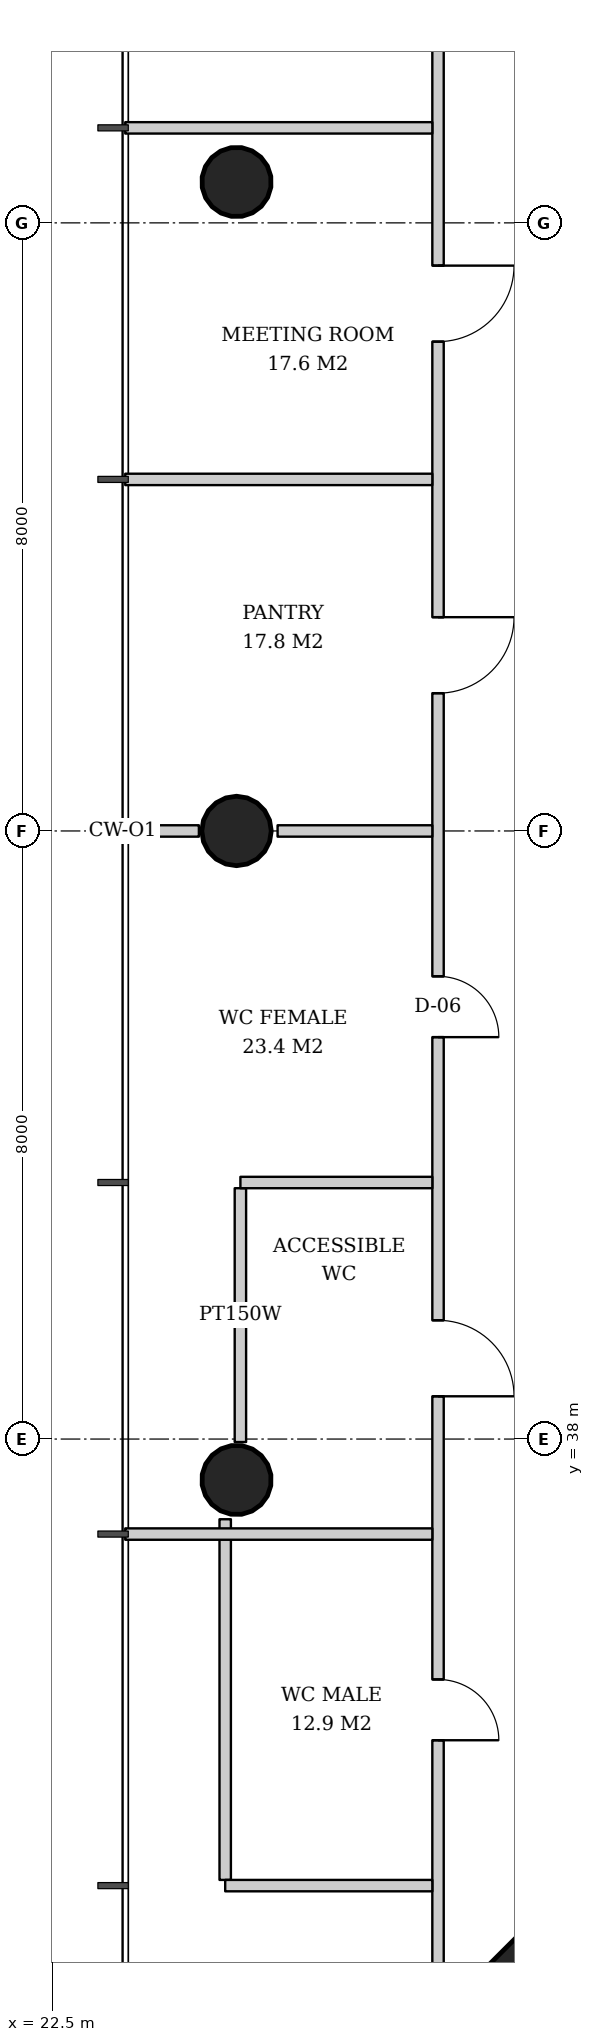
"""IFC4 building model, lengths in metres.
Left out: names, types, materials, properties, quantities, classifications, styles, units other than length and angle.
Written with IfcOpenShell. Run it as: python <this file> out.ifc"""

import sys

from ifc_helpers import new_model, si_unit, direction, frame, frame_2d, origin, origin_2d, place, context, subcontext, project, spatial, rectangle, hollow_circle, extrude, element, fill, save


model = new_model("IFC4")
c1 = context("Model", 3, precision=1e-05, world=origin(), true_north=direction((0.0, 1.0)))
c2 = subcontext(c1, "Body", "Model", "MODEL_VIEW")
j1 = project(units=[si_unit("LENGTHUNIT", "METRE"), si_unit("PLANEANGLEUNIT", "RADIAN")], contexts=[c1])
p1 = place(None, origin())
s1 = spatial("IfcSite", under=j1, at=p1, CompositionType="ELEMENT")
p2 = place(p1, origin())
s2 = spatial("IfcBuilding", under=s1, at=p2, CompositionType="ELEMENT")
p3 = place(p2, frame((0.0, 0.0, 142.6)))
s3 = spatial("IfcBuildingStorey", under=s2, at=p3, CompositionType="ELEMENT", Elevation=142.6)
p4 = place(p3, frame((28.986, 29.986, 0.0), z_axis=(0.031964207655, 0.031964207655, 0.998977766949), x_axis=(-0.707106781187, 0.707106781187, 0.0)))
e1 = element("IfcColumn", 1, at=p4, inside=s3, PredefinedType="COLUMN", context=c2, shape_type="SweptSolid", body=[
    extrude(rectangle(XDim=2.6, YDim=2.6, at=origin_2d()), origin(), (0.0, 0.0, 1.0), 3.804),
])
p5 = place(p3, frame((24.886, 54.557, 0.0), z_axis=(0.031912317206, -0.01598826355, 0.999362786699), x_axis=(0.447933021895, 0.894067115991, 0.0)))
e2 = element("IfcColumn", 2, at=p5, inside=s3, PredefinedType="COLUMN", context=c2, shape_type="SweptSolid", body=[
    extrude(hollow_circle(Radius=0.457, WallThickness=0.03, at=origin_2d()), origin(), (0.0, 0.0, 1.0), 3.802),
])
p6 = place(p3, frame((24.886, 46.0, 0.0), z_axis=(0.031916396774, 0.0, 0.999490542035), x_axis=(0.0, 1.0, 0.0)))
e3 = element("IfcColumn", 3, at=p6, inside=s3, PredefinedType="COLUMN", context=c2, shape_type="SweptSolid", body=[
    extrude(hollow_circle(Radius=0.457, WallThickness=0.03, at=origin_2d()), origin(), (0.0, 0.0, 1.0), 3.802),
])
p7 = place(p3, frame((24.886, 37.443, 0.0), z_axis=(0.031912317206, 0.01598826355, 0.999362786699), x_axis=(-0.447933021895, 0.894067115991, 0.0)))
e4 = element("IfcColumn", 4, at=p7, inside=s3, PredefinedType="COLUMN", context=c2, shape_type="SweptSolid", body=[
    extrude(hollow_circle(Radius=0.457, WallThickness=0.03, at=origin_2d()), origin(), (0.0, 0.0, 1.0), 3.802),
])
p8 = place(p3, frame((24.975, 41.3, 0.0), z_axis=(0.0, 0.0, 1.0), x_axis=(0.0, -1.0, 0.0)))
e5 = element("IfcWall", 5, at=p8, inside=s3, PredefinedType="PARTITIONING", context=c2, shape_type="SweptSolid", body=[
    extrude(rectangle(XDim=3.34, YDim=0.15, at=frame_2d((1.67, 0.0))), origin(), (0.0, 0.0, 1.0), 2.806),
])
p9 = place(p3, frame((24.775, 36.945, 0.0), z_axis=(0.0, 0.0, 1.0), x_axis=(0.0, -1.0, 0.0)))
e6 = element("IfcWall", 6, at=p9, inside=s3, PredefinedType="PARTITIONING", context=c2, shape_type="SweptSolid", body=[
    extrude(rectangle(XDim=4.745, YDim=0.15, at=frame_2d((2.373, 0.0))), origin(), (0.0, 0.0, 1.0), 3.62),
])
p10 = place(p3, frame((27.575, 61.511, 0.0), z_axis=(0.0, 0.0, 1.0), x_axis=(0.0, -1.0, 0.0)))
e7 = element("IfcWall", 7, at=p10, inside=s3, PredefinedType="PARTITIONING", context=c2, shape_type="SweptSolid", body=[
    extrude(rectangle(XDim=31.023, YDim=0.15, at=frame_2d((15.511, 0.0))), origin(), (0.0, 0.0, 1.0), 2.72),
])
p11 = place(p10, frame((3.449, 0.0, 0.0)))
e8 = element("IfcOpeningElement", 8, at=p11, cuts=e7, PredefinedType="OPENING", context=c2, shape_type="SweptSolid", body=[
    extrude(rectangle(XDim=1.0, YDim=2.1, at=frame_2d((0.5, 1.05))), frame((0.0, 0.085, 0.0), z_axis=(0.0, -1.0, 0.0), x_axis=(1.0, 0.0, 0.0)), (0.0, 0.0, 1.0), 0.17),
])
p12 = place(p10, frame((8.074, 0.0, 0.0)))
e9 = element("IfcOpeningElement", 9, at=p12, cuts=e7, PredefinedType="OPENING", context=c2, shape_type="SweptSolid", body=[
    extrude(rectangle(XDim=1.0, YDim=2.1, at=frame_2d((0.5, 1.05))), frame((0.0, 0.085, 0.0), z_axis=(0.0, -1.0, 0.0), x_axis=(1.0, 0.0, 0.0)), (0.0, 0.0, 1.0), 0.17),
])
p13 = place(p10, frame((12.699, 0.0, 0.0)))
e10 = element("IfcOpeningElement", 10, at=p13, cuts=e7, PredefinedType="OPENING", context=c2, shape_type="SweptSolid", body=[
    extrude(rectangle(XDim=1.0, YDim=2.1, at=frame_2d((0.5, 1.05))), frame((0.0, 0.085, 0.0), z_axis=(0.0, -1.0, 0.0), x_axis=(1.0, 0.0, 0.0)), (0.0, 0.0, 1.0), 0.17),
])
p14 = place(p10, frame((17.424, 0.0, 0.0)))
e11 = element("IfcOpeningElement", 11, at=p14, cuts=e7, PredefinedType="OPENING", context=c2, shape_type="SweptSolid", body=[
    extrude(rectangle(XDim=0.8, YDim=2.1, at=frame_2d((0.4, 1.05))), frame((0.0, 0.085, 0.0), z_axis=(0.0, -1.0, 0.0), x_axis=(1.0, 0.0, 0.0)), (0.0, 0.0, 1.0), 0.17),
])
p15 = place(p10, frame((21.949, 0.0, 0.0)))
e12 = element("IfcOpeningElement", 12, at=p15, cuts=e7, PredefinedType="OPENING", context=c2, shape_type="SweptSolid", body=[
    extrude(rectangle(XDim=1.0, YDim=2.1, at=frame_2d((0.5, 1.05))), frame((0.0, 0.085, 0.0), z_axis=(0.0, -1.0, 0.0), x_axis=(1.0, 0.0, 0.0)), (0.0, 0.0, 1.0), 0.17),
])
p16 = place(p10, frame((26.674, 0.0, 0.0)))
e13 = element("IfcOpeningElement", 13, at=p16, cuts=e7, PredefinedType="OPENING", context=c2, shape_type="SweptSolid", body=[
    extrude(rectangle(XDim=0.8, YDim=2.1, at=frame_2d((0.4, 1.05))), frame((0.0, 0.085, 0.0), z_axis=(0.0, -1.0, 0.0), x_axis=(1.0, 0.0, 0.0)), (0.0, 0.0, 1.0), 0.17),
])
for number, where, z_axis, x_axis in (
    (14, (27.5, 55.25, 0.0), (0.0, 0.0, 1.0), (-1.0, 0.0, 0.0)),
    (15, (27.5, 50.625, 0.0), (0.0, 0.0, 1.0), (-1.0, 0.0, 0.0)),
):
    element("IfcWall", number, at=place(p3, frame(where, z_axis=z_axis, x_axis=x_axis)), inside=s3, PredefinedType="PARTITIONING", context=c2, shape_type="SweptSolid", body=[
        extrude(rectangle(XDim=4.04, YDim=0.15, at=frame_2d((2.02, 0.0))), origin(), (0.0, 0.0, 1.0), 2.82),
    ])
p17 = place(p3, frame((27.5, 46.0, 0.0), z_axis=(0.0, 0.0, 1.0), x_axis=(-1.0, 0.0, 0.0)))
e16 = element("IfcWall", 16, at=p17, inside=s3, PredefinedType="PARTITIONING", context=c2, shape_type="SweptSolid", body=[
    extrude(rectangle(XDim=2.036, YDim=0.15, at=frame_2d((1.018, 0.0))), origin(), (0.0, 0.0, 1.0), 3.62),
])
p18 = place(p3, frame((24.429, 46.0, 0.0), z_axis=(0.0, 0.0, 1.0), x_axis=(-1.0, 0.0, 0.0)))
e17 = element("IfcWall", 17, at=p18, inside=s3, PredefinedType="PARTITIONING", context=c2, shape_type="SweptSolid", body=[
    extrude(rectangle(XDim=0.969, YDim=0.15, at=frame_2d((0.484, 0.0))), origin(), (0.0, 0.0, 1.0), 3.62),
])
p19 = place(p3, frame((27.5, 41.375, 0.0), z_axis=(0.0, 0.0, 1.0), x_axis=(-1.0, 0.0, 0.0)))
e18 = element("IfcWall", 18, at=p19, inside=s3, PredefinedType="PARTITIONING", context=c2, shape_type="SweptSolid", body=[
    extrude(rectangle(XDim=2.525, YDim=0.15, at=frame_2d((1.262, 0.0))), origin(), (0.0, 0.0, 1.0), 2.82),
])
p20 = place(p3, frame((27.5, 36.75, 0.0), z_axis=(0.0, 0.0, 1.0), x_axis=(-1.0, 0.0, 0.0)))
e19 = element("IfcWall", 19, at=p20, inside=s3, PredefinedType="PARTITIONING", context=c2, shape_type="SweptSolid", body=[
    extrude(rectangle(XDim=4.04, YDim=0.15, at=frame_2d((2.02, 0.0))), origin(), (0.0, 0.0, 1.0), 2.82),
])
p21 = place(p3, frame((27.5, 32.125, 0.0), z_axis=(0.0, 0.0, 1.0), x_axis=(-1.0, 0.0, 0.0)))
e20 = element("IfcWall", 20, at=p21, inside=s3, PredefinedType="PARTITIONING", context=c2, shape_type="SweptSolid", body=[
    extrude(rectangle(XDim=2.725, YDim=0.15, at=frame_2d((1.363, 0.0))), origin(), (0.0, 0.0, 1.0), 2.82),
])
p22 = place(p12, origin())
e21 = element("IfcDoor", 21, at=p22, inside=s3, OperationType="SINGLE_SWING_LEFT", PredefinedType="DOOR", context=c2, shape_type="SweptSolid", body=[
    extrude(rectangle(XDim=1.0, YDim=2.1, at=frame_2d((0.5, 1.05))), frame((0.0, 0.025, 0.0), z_axis=(0.0, -1.0, 0.0), x_axis=(1.0, 0.0, 0.0)), (0.0, 0.0, 1.0), 0.05),
])
fill(e9, e21)
p23 = place(p13, origin())
e22 = element("IfcDoor", 22, at=p23, inside=s3, OperationType="SINGLE_SWING_LEFT", PredefinedType="DOOR", context=c2, shape_type="SweptSolid", body=[
    extrude(rectangle(XDim=1.0, YDim=2.1, at=frame_2d((0.5, 1.05))), frame((0.0, 0.025, 0.0), z_axis=(0.0, -1.0, 0.0), x_axis=(1.0, 0.0, 0.0)), (0.0, 0.0, 1.0), 0.05),
])
fill(e10, e22)
p24 = place(p14, origin())
e23 = element("IfcDoor", 23, at=p24, inside=s3, OperationType="SINGLE_SWING_RIGHT", PredefinedType="DOOR", context=c2, shape_type="SweptSolid", body=[
    extrude(rectangle(XDim=0.8, YDim=2.1, at=frame_2d((0.4, 1.05))), frame((0.0, 0.025, 0.0), z_axis=(0.0, -1.0, 0.0), x_axis=(1.0, 0.0, 0.0)), (0.0, 0.0, 1.0), 0.05),
])
fill(e11, e23)
p25 = place(p15, origin())
e24 = element("IfcDoor", 24, at=p25, inside=s3, OperationType="SINGLE_SWING_RIGHT", PredefinedType="DOOR", context=c2, shape_type="SweptSolid", body=[
    extrude(rectangle(XDim=1.0, YDim=2.1, at=frame_2d((0.5, 1.05))), frame((0.0, 0.025, 0.0), z_axis=(0.0, -1.0, 0.0), x_axis=(1.0, 0.0, 0.0)), (0.0, 0.0, 1.0), 0.05),
])
fill(e12, e24)
p26 = place(p16, origin())
e25 = element("IfcDoor", 25, at=p26, inside=s3, OperationType="SINGLE_SWING_RIGHT", PredefinedType="DOOR", context=c2, shape_type="SweptSolid", body=[
    extrude(rectangle(XDim=0.8, YDim=2.1, at=frame_2d((0.4, 1.05))), frame((0.0, 0.025, 0.0), z_axis=(0.0, -1.0, 0.0), x_axis=(1.0, 0.0, 0.0)), (0.0, 0.0, 1.0), 0.05),
])
fill(e13, e25)
save(model, sys.argv[1])
